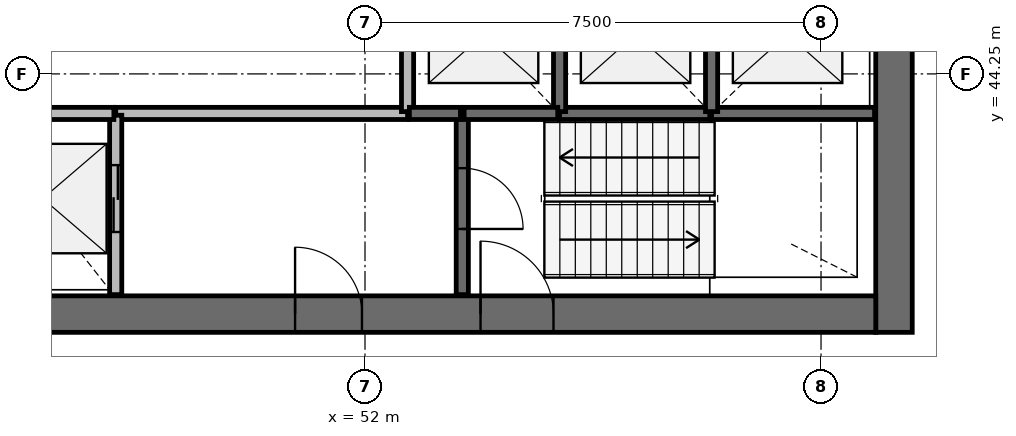
"""IFC4 building model, lengths in metres.
Left out: names, types, materials, properties, quantities, classifications, styles, units other than length and angle.
Written with IfcOpenShell. Run it as: python <this file> out.ifc"""

import sys

from ifc_helpers import new_model, si_unit, direction, frame, frame_2d, origin, place, context, subcontext, project, spatial, rectangle, extrude, source, transform, mapped, element, fill, save


model = new_model("IFC4")
c1 = context("Model", 3, precision=1e-05, world=origin(), true_north=direction((0.0, 1.0)))
c2 = subcontext(c1, "Body", "Model", "MODEL_VIEW")
j1 = project(units=[si_unit("LENGTHUNIT", "METRE"), si_unit("PLANEANGLEUNIT", "RADIAN")], contexts=[c1])
p1 = place(None, origin())
s1 = spatial("IfcSite", under=j1, at=p1, CompositionType="ELEMENT")
p2 = place(p1, origin())
s2 = spatial("IfcBuilding", under=s1, at=p2, CompositionType="ELEMENT")
p3 = place(p2, frame((0.0, 0.0, 199.4)))
s3 = spatial("IfcBuildingStorey", under=s2, at=p3, CompositionType="ELEMENT", Elevation=199.4)
p4 = place(p3, frame((60.7, 40.0, 0.0), z_axis=(0.0, 0.0, 1.0), x_axis=(0.0, 1.0, 0.0)))
e1 = element("IfcWall", 1, at=p4, inside=s3, PredefinedType="SHEAR", context=c2, shape_type="SweptSolid", body=[
    extrude(rectangle(XDim=16.0, YDim=0.6, at=frame_2d((8.0, 0.0))), origin(), (0.0, 0.0, 1.0), 3.9),
])
p5 = place(p4, frame((7.1, 0.0, 0.0)))
e2 = element("IfcOpeningElement", 2, at=p5, cuts=e1, PredefinedType="OPENING", context=c2, shape_type="SweptSolid", body=[
    extrude(rectangle(XDim=1.8, YDim=2.1, at=frame_2d((0.9, 1.05))), frame((0.0, 0.31, 0.0), z_axis=(0.0, -1.0, 0.0), x_axis=(1.0, 0.0, 0.0)), (0.0, 0.0, 1.0), 0.62),
])
p6 = place(p3, frame((43.6, 40.3, 0.0), z_axis=(0.0, 0.0, 1.0), x_axis=(1.0, 0.0, 0.0)))
e3 = element("IfcWall", 3, at=p6, inside=s3, PredefinedType="SHEAR", context=c2, shape_type="SweptSolid", body=[
    extrude(rectangle(XDim=16.8, YDim=0.6, at=frame_2d((8.4, 0.0))), origin(), (0.0, 0.0, 1.0), 3.9),
])
p7 = place(p6, frame((10.3, 0.0, 0.0)))
e4 = element("IfcOpeningElement", 4, at=p7, cuts=e3, PredefinedType="OPENING", context=c2, shape_type="SweptSolid", body=[
    extrude(rectangle(XDim=1.2, YDim=2.1, at=frame_2d((0.6, 1.05))), frame((0.0, 0.31, 0.0), z_axis=(0.0, -1.0, 0.0), x_axis=(1.0, 0.0, 0.0)), (0.0, 0.0, 1.0), 0.62),
])
p8 = place(p6, frame((7.25, 0.0, 0.0)))
e5 = element("IfcOpeningElement", 5, at=p8, cuts=e3, PredefinedType="OPENING", context=c2, shape_type="SweptSolid", body=[
    extrude(rectangle(XDim=1.1, YDim=2.1, at=frame_2d((0.55, 1.05))), frame((0.0, 0.31, 0.0), z_axis=(0.0, -1.0, 0.0), x_axis=(1.0, 0.0, 0.0)), (0.0, 0.0, 1.0), 0.62),
])
p9 = place(p6, frame((0.7, 0.0, 0.0)))
e6 = element("IfcOpeningElement", 6, at=p9, cuts=e3, PredefinedType="OPENING", context=c2, shape_type="SweptSolid", body=[
    extrude(rectangle(XDim=0.8, YDim=2.1, at=frame_2d((0.4, 1.05))), frame((0.0, 0.31, 0.0), z_axis=(0.0, -1.0, 0.0), x_axis=(1.0, 0.0, 0.0)), (0.0, 0.0, 1.0), 0.62),
])
p10 = place(p3, frame((52.7, 43.6, 0.0), z_axis=(0.0, 0.0, 1.0), x_axis=(-1.0, 0.0, 0.0)))
e7 = element("IfcWall", 7, at=p10, inside=s3, PredefinedType="SOLIDWALL", context=c2, shape_type="SweptSolid", body=[
    extrude(rectangle(XDim=4.8, YDim=0.2, at=frame_2d((2.4, 0.0))), origin(), (0.0, 0.0, 1.0), 3.58),
])
p11 = place(p3, frame((47.9, 40.62, 0.0), z_axis=(0.0, 0.0, 1.0), x_axis=(0.0, 1.0, 0.0)))
e8 = element("IfcWall", 8, at=p11, inside=s3, PredefinedType="SOLIDWALL", context=c2, shape_type="SweptSolid", body=[
    extrude(rectangle(XDim=2.95, YDim=0.2, at=frame_2d((1.475, 0.0))), origin(), (0.0, 0.0, 1.0), 3.58),
])
p12 = place(p11, frame((1.03, 0.0, 0.0)))
e9 = element("IfcOpeningElement", 9, at=p12, cuts=e8, PredefinedType="OPENING", context=c2, shape_type="SweptSolid", body=[
    extrude(rectangle(XDim=1.1, YDim=2.1, at=frame_2d((0.55, 1.05))), frame((0.0, 0.11, 0.0), z_axis=(0.0, -1.0, 0.0), x_axis=(1.0, 0.0, 0.0)), (0.0, 0.0, 1.0), 0.22),
])
p13 = place(p3, frame((53.6, 43.6, 0.0), z_axis=(0.0, 0.0, 1.0), x_axis=(0.0, -1.0, 0.0)))
e10 = element("IfcWall", 10, at=p13, inside=s3, PredefinedType="SOLIDWALL", context=c2, shape_type="SweptSolid", body=[
    extrude(rectangle(XDim=2.98, YDim=0.2, at=frame_2d((1.49, 0.0))), origin(), (0.0, 0.0, 1.0), 3.58),
])
p14 = place(p13, frame((0.9, 0.0, 0.0)))
e11 = element("IfcOpeningElement", 11, at=p14, cuts=e10, PredefinedType="OPENING", context=c2, shape_type="SweptSolid", body=[
    extrude(rectangle(XDim=1.0, YDim=2.1, at=frame_2d((0.5, 1.05))), frame((0.0, 0.11, 0.0), z_axis=(0.0, -1.0, 0.0), x_axis=(1.0, 0.0, 0.0)), (0.0, 0.0, 1.0), 0.22),
])
p15 = place(p3, frame((57.7, 43.6, 0.0), z_axis=(0.0, 0.0, 1.0), x_axis=(1.0, 0.0, 0.0)))
e12 = element("IfcWall", 12, at=p15, inside=s3, PredefinedType="SOLIDWALL", context=c2, shape_type="SweptSolid", body=[
    extrude(rectangle(XDim=2.68, YDim=0.2, at=frame_2d((1.34, 0.0))), origin(), (0.0, 0.0, 1.0), 3.58),
])
p16 = place(p3, frame((55.2, 43.6, 0.0), z_axis=(0.0, 0.0, 1.0), x_axis=(1.0, 0.0, 0.0)))
e13 = element("IfcWall", 13, at=p16, inside=s3, PredefinedType="SOLIDWALL", context=c2, shape_type="SweptSolid", body=[
    extrude(rectangle(XDim=2.47, YDim=0.2, at=frame_2d((1.235, 0.0))), origin(), (0.0, 0.0, 1.0), 3.58),
])
p17 = place(p3, frame((47.87, 43.6, 0.0), z_axis=(0.0, 0.0, 1.0), x_axis=(-1.0, 0.0, 0.0)))
e14 = element("IfcWall", 14, at=p17, inside=s3, PredefinedType="SOLIDWALL", context=c2, shape_type="SweptSolid", body=[
    extrude(rectangle(XDim=2.34, YDim=0.2, at=frame_2d((1.17, 0.0))), origin(), (0.0, 0.0, 1.0), 3.58),
])
for number, where, z_axis, x_axis in (
    (15, (52.7, 45.99, 0.0), (0.0, 0.0, 1.0), (0.0, -1.0, 0.0)),
    (16, (55.2, 43.63, 0.0), (0.0, 0.0, 1.0), (0.0, 1.0, 0.0)),
    (17, (57.7, 43.63, 0.0), (0.0, 0.0, 1.0), (0.0, 1.0, 0.0)),
):
    element("IfcWall", number, at=place(p3, frame(where, z_axis=z_axis, x_axis=x_axis)), inside=s3, PredefinedType="SOLIDWALL", context=c2, shape_type="SweptSolid", body=[
        extrude(rectangle(XDim=2.36, YDim=0.2, at=frame_2d((1.18, 0.0))), origin(), (0.0, 0.0, 1.0), 3.58),
    ])
p18 = place(p3, frame((53.63, 43.6, 0.0), z_axis=(0.0, 0.0, 1.0), x_axis=(1.0, 0.0, 0.0)))
e18 = element("IfcWall", 18, at=p18, inside=s3, PredefinedType="SOLIDWALL", context=c2, shape_type="SweptSolid", body=[
    extrude(rectangle(XDim=1.54, YDim=0.2, at=frame_2d((0.77, 0.0))), origin(), (0.0, 0.0, 1.0), 3.58),
])
p19 = place(p3, frame((52.73, 43.6, 0.0), z_axis=(0.0, 0.0, 1.0), x_axis=(1.0, 0.0, 0.0)))
e19 = element("IfcWall", 19, at=p19, inside=s3, PredefinedType="SOLIDWALL", context=c2, shape_type="SweptSolid", body=[
    extrude(rectangle(XDim=0.84, YDim=0.2, at=frame_2d((0.42, 0.0))), origin(), (0.0, 0.0, 1.0), 3.58),
])
m1 = source(origin(), c2, "Body", "SweptSolid", [
    extrude(rectangle(XDim=1.1, YDim=2.1, at=frame_2d((0.55, 1.05))), frame((0.0, 0.025, 0.0), z_axis=(0.0, -1.0, 0.0), x_axis=(1.0, 0.0, 0.0)), (0.0, 0.0, 1.0), 0.05),
])
p20 = place(p12, origin())
e20 = element("IfcDoor", 20, at=p20, inside=s3, OperationType="DOUBLE_DOOR_SLIDING", PredefinedType="USERDEFINED", context=c2, shape_type="MappedRepresentation", body=[
    mapped(m1, transform((0.0, 0.0, 0.0), scale=1.0)),
])
fill(e9, e20)
m2 = source(origin(), c2, "Body", "SweptSolid", [
    extrude(rectangle(XDim=1.2, YDim=2.1, at=frame_2d((0.6, 1.05))), frame((0.0, 0.025, 0.0), z_axis=(0.0, -1.0, 0.0), x_axis=(1.0, 0.0, 0.0)), (0.0, 0.0, 1.0), 0.05),
])
p21 = place(p7, origin())
e21 = element("IfcDoor", 21, at=p21, inside=s3, OperationType="SINGLE_SWING_LEFT", PredefinedType="DOOR", context=c2, shape_type="MappedRepresentation", body=[
    mapped(m2, transform((0.0, 0.0, 0.0), scale=1.0)),
])
fill(e4, e21)
m3 = source(origin(), c2, "Body", "SweptSolid", [
    extrude(rectangle(XDim=1.0, YDim=2.1, at=frame_2d((0.5, 1.05))), frame((0.0, 0.025, 0.0), z_axis=(0.0, -1.0, 0.0), x_axis=(1.0, 0.0, 0.0)), (0.0, 0.0, 1.0), 0.05),
])
p22 = place(p14, origin())
e22 = element("IfcDoor", 22, at=p22, inside=s3, OperationType="SINGLE_SWING_RIGHT", PredefinedType="DOOR", context=c2, shape_type="MappedRepresentation", body=[
    mapped(m3, transform((0.0, 0.0, 0.0), scale=1.0)),
])
fill(e11, e22)
m4 = source(origin(), c2, "Body", "SweptSolid", [
    extrude(rectangle(XDim=1.1, YDim=2.1, at=frame_2d((0.55, 1.05))), frame((0.0, 0.025, 0.0), z_axis=(0.0, -1.0, 0.0), x_axis=(1.0, 0.0, 0.0)), (0.0, 0.0, 1.0), 0.05),
])
p23 = place(p8, origin())
e23 = element("IfcDoor", 23, at=p23, inside=s3, OperationType="SINGLE_SWING_LEFT", PredefinedType="DOOR", context=c2, shape_type="MappedRepresentation", body=[
    mapped(m4, transform((0.0, 0.0, 0.0), scale=1.0)),
])
fill(e5, e23)
save(model, sys.argv[1])
